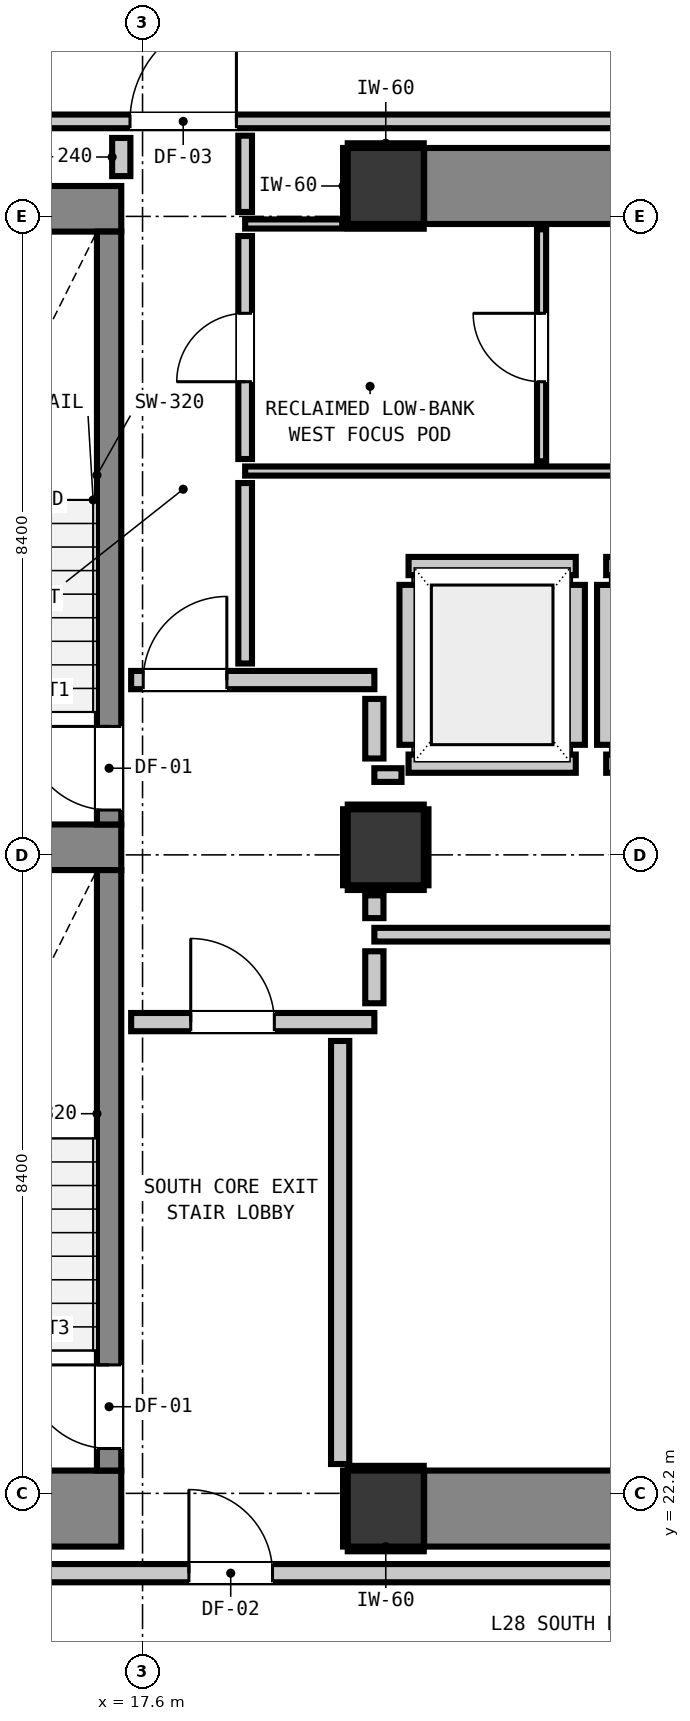
"""IFC4 building model, lengths in metres.
Left out: names, types, materials, properties, quantities, classifications, styles, units other than length and angle.
Written with IfcOpenShell. Run it as: python <this file> out.ifc"""

import sys

from ifc_helpers import new_model, si_unit, direction, frame, frame_2d, origin, origin_2d, place, context, subcontext, project, spatial, rectangle, extrude, element, fill, save


model = new_model("IFC4")
c1 = context("Model", 3, precision=1e-05, world=origin(), true_north=direction((0.0, 1.0)))
c2 = subcontext(c1, "Body", "Model", "MODEL_VIEW")
j1 = project(units=[si_unit("LENGTHUNIT", "METRE"), si_unit("PLANEANGLEUNIT", "RADIAN")], contexts=[c1])
p1 = place(None, origin())
s1 = spatial("IfcSite", under=j1, at=p1, CompositionType="ELEMENT")
p2 = place(p1, origin())
s2 = spatial("IfcBuilding", under=s1, at=p2, CompositionType="ELEMENT")
p3 = place(p2, frame((0.0, 0.0, 99.44)))
s3 = spatial("IfcBuildingStorey", under=s2, at=p3, CompositionType="ELEMENT", Elevation=99.44)
for number, where, z_axis, x_axis in (
    (1, (20.8, 22.0, 0.0), (0.0, 0.0, 1.0), (1.0, 0.0, 0.0)),
    (2, (20.8, 39.4, 0.0), (0.0, 0.0, 1.0), (1.0, 0.0, 0.0)),
):
    element("IfcColumn", number, at=place(p3, frame(where, z_axis=z_axis, x_axis=x_axis)), inside=s3, PredefinedType="COLUMN", context=c2, shape_type="SweptSolid", body=[
        extrude(rectangle(XDim=1.0, YDim=1.0, at=origin_2d()), origin(), (0.0, 0.0, 1.0), 3.32),
    ])
p4 = place(p3, frame((13.24, 22.0, 0.0), z_axis=(0.0, 0.0, 1.0), x_axis=(1.0, 0.0, 0.0)))
e3 = element("IfcWall", 3, at=p4, inside=s3, PredefinedType="SHEAR", context=c2, shape_type="SweptSolid", body=[
    extrude(rectangle(XDim=4.08, YDim=1.0, at=frame_2d((2.04, 0.0))), origin(), (0.0, 0.0, 1.0), 3.32),
])
p5 = place(p3, frame((13.24, 39.1, 0.0), z_axis=(0.0, 0.0, 1.0), x_axis=(1.0, 0.0, 0.0)))
e4 = element("IfcWall", 4, at=p5, inside=s3, PredefinedType="SHEAR", context=c2, shape_type="SweptSolid", body=[
    extrude(rectangle(XDim=4.08, YDim=0.6, at=frame_2d((2.04, 0.0))), origin(), (0.0, 0.0, 1.0), 3.32),
])
p6 = place(p3, frame((13.905, 30.7, 0.0), z_axis=(0.0, 0.0, 1.0), x_axis=(1.0, 0.0, 0.0)))
e5 = element("IfcWall", 5, at=p6, inside=s3, PredefinedType="SHEAR", context=c2, shape_type="SweptSolid", body=[
    extrude(rectangle(XDim=3.415, YDim=0.6, at=frame_2d((1.708, 0.0))), origin(), (0.0, 0.0, 1.0), 3.32),
])
for number, where, z_axis, x_axis in (
    (6, (21.305, 22.0, 0.0), (0.0, 0.0, 1.0), (1.0, 0.0, 0.0)),
    (7, (21.305, 39.4, 0.0), (0.0, 0.0, 1.0), (1.0, 0.0, 0.0)),
):
    element("IfcWall", number, at=place(p3, frame(where, z_axis=z_axis, x_axis=x_axis)), inside=s3, PredefinedType="SHEAR", context=c2, shape_type="SweptSolid", body=[
        extrude(rectangle(XDim=7.39, YDim=1.0, at=frame_2d((3.695, 0.0))), origin(), (0.0, 0.0, 1.0), 3.32),
    ])
p7 = place(p3, frame((17.16, 31.0, 0.0), z_axis=(0.0, 0.0, 1.0), x_axis=(0.0, 1.0, 0.0)))
e8 = element("IfcWall", 8, at=p7, inside=s3, PredefinedType="SHEAR", context=c2, shape_type="SweptSolid", body=[
    extrude(rectangle(XDim=7.8, YDim=0.32, at=frame_2d((3.9, 0.0))), origin(), (0.0, 0.0, 1.0), 3.32),
])
p8 = place(p7, frame((0.19, 0.0, 0.0)))
e9 = element("IfcOpeningElement", 9, at=p8, cuts=e8, PredefinedType="OPENING", context=c2, shape_type="SweptSolid", body=[
    extrude(rectangle(XDim=1.1, YDim=2.15, at=frame_2d((0.55, 1.075))), frame((0.0, 0.17, 0.0), z_axis=(0.0, -1.0, 0.0), x_axis=(1.0, 0.0, 0.0)), (0.0, 0.0, 1.0), 0.34),
])
p9 = place(p3, frame((17.16, 22.5, 0.0), z_axis=(0.0, 0.0, 1.0), x_axis=(0.0, 1.0, 0.0)))
e10 = element("IfcWall", 10, at=p9, inside=s3, PredefinedType="SHEAR", context=c2, shape_type="SweptSolid", body=[
    extrude(rectangle(XDim=7.9, YDim=0.32, at=frame_2d((3.95, 0.0))), origin(), (0.0, 0.0, 1.0), 3.32),
])
p10 = place(p9, frame((0.29, 0.0, 0.0)))
e11 = element("IfcOpeningElement", 11, at=p10, cuts=e10, PredefinedType="OPENING", context=c2, shape_type="SweptSolid", body=[
    extrude(rectangle(XDim=1.1, YDim=2.15, at=frame_2d((0.55, 1.075))), frame((0.0, 0.17, 0.0), z_axis=(0.0, -1.0, 0.0), x_axis=(1.0, 0.0, 0.0)), (0.0, 0.0, 1.0), 0.34),
])
p11 = place(p3, frame((20.8, 30.7, 0.0), z_axis=(0.0, 0.0, 1.0), x_axis=(1.0, 0.0, 0.0)))
e12 = element("IfcColumn", 12, at=p11, inside=s3, PredefinedType="COLUMN", context=c2, shape_type="SweptSolid", body=[
    extrude(rectangle(XDim=1.0, YDim=1.0, at=origin_2d()), origin(), (0.0, 0.0, 1.0), 3.32),
])
for number, where, z_axis, x_axis in (
    (13, (21.1, 31.8, 0.0), (0.0, 0.0, 1.0), (1.0, 0.0, 0.0)),
    (14, (21.1, 34.4, 0.0), (0.0, 0.0, 1.0), (1.0, 0.0, 0.0)),
):
    element("IfcWall", number, at=place(p3, frame(where, z_axis=z_axis, x_axis=x_axis)), inside=s3, PredefinedType="PARTITIONING", context=c2, shape_type="SweptSolid", body=[
        extrude(rectangle(XDim=2.2, YDim=0.24, at=frame_2d((1.1, 0.0))), origin(), (0.0, 0.0, 1.0), 3.06),
    ])
p12 = place(p3, frame((21.1, 32.048, 0.0), z_axis=(0.0, 0.0, 1.0), x_axis=(0.0, 1.0, 0.0)))
e15 = element("IfcWall", 15, at=p12, inside=s3, PredefinedType="PARTITIONING", context=c2, shape_type="SweptSolid", body=[
    extrude(rectangle(XDim=2.104, YDim=0.24, at=frame_2d((1.052, 0.0))), origin(), (0.0, 0.0, 1.0), 2.295),
])
p13 = place(p3, frame((23.3, 32.048, 0.0), z_axis=(0.0, 0.0, 1.0), x_axis=(0.0, 1.0, 0.0)))
e16 = element("IfcWall", 16, at=p13, inside=s3, PredefinedType="PARTITIONING", context=c2, shape_type="SweptSolid", body=[
    extrude(rectangle(XDim=2.104, YDim=0.24, at=frame_2d((1.052, 0.0))), origin(), (0.0, 0.0, 1.0), 3.06),
])
for number, where, z_axis, x_axis in (
    (17, (23.7, 31.8, 0.0), (0.0, 0.0, 1.0), (1.0, 0.0, 0.0)),
    (18, (23.7, 34.4, 0.0), (0.0, 0.0, 1.0), (1.0, 0.0, 0.0)),
):
    element("IfcWall", number, at=place(p3, frame(where, z_axis=z_axis, x_axis=x_axis)), inside=s3, PredefinedType="PARTITIONING", context=c2, shape_type="SweptSolid", body=[
        extrude(rectangle(XDim=2.2, YDim=0.24, at=frame_2d((1.1, 0.0))), origin(), (0.0, 0.0, 1.0), 3.06),
    ])
p14 = place(p3, frame((23.7, 32.048, 0.0), z_axis=(0.0, 0.0, 1.0), x_axis=(0.0, 1.0, 0.0)))
e19 = element("IfcWall", 19, at=p14, inside=s3, PredefinedType="PARTITIONING", context=c2, shape_type="SweptSolid", body=[
    extrude(rectangle(XDim=2.104, YDim=0.24, at=frame_2d((1.052, 0.0))), origin(), (0.0, 0.0, 1.0), 3.06),
])
p15 = place(p3, frame((12.993, 21.15, 0.0), z_axis=(0.0, 0.0, 1.0), x_axis=(1.0, 0.0, 0.0)))
e20 = element("IfcWall", 20, at=p15, inside=s3, PredefinedType="PARTITIONING", context=c2, shape_type="SweptSolid", body=[
    extrude(rectangle(XDim=30.98, YDim=0.24, at=frame_2d((15.49, 0.0))), origin(), (0.0, 0.0, 1.0), 3.06),
])
p16 = place(p15, frame((5.217, 0.0, 0.0)))
e21 = element("IfcOpeningElement", 21, at=p16, cuts=e20, PredefinedType="OPENING", context=c2, shape_type="SweptSolid", body=[
    extrude(rectangle(XDim=1.1, YDim=2.15, at=frame_2d((0.55, 1.075))), frame((0.0, 0.13, 0.0), z_axis=(0.0, -1.0, 0.0), x_axis=(1.0, 0.0, 0.0)), (0.0, 0.0, 1.0), 0.26),
])
p17 = place(p15, frame((25.057, 0.0, 0.0)))
e22 = element("IfcOpeningElement", 22, at=p17, cuts=e20, PredefinedType="OPENING", context=c2, shape_type="SweptSolid", body=[
    extrude(rectangle(XDim=1.4, YDim=2.15, at=frame_2d((0.7, 1.075))), frame((0.0, 0.13, 0.0), z_axis=(0.0, -1.0, 0.0), x_axis=(1.0, 0.0, 0.0)), (0.0, 0.0, 1.0), 0.26),
])
p18 = place(p3, frame((17.45, 28.4, 0.0), z_axis=(0.0, 0.0, 1.0), x_axis=(1.0, 0.0, 0.0)))
e23 = element("IfcWall", 23, at=p18, inside=s3, PredefinedType="PARTITIONING", context=c2, shape_type="SweptSolid", body=[
    extrude(rectangle(XDim=3.2, YDim=0.24, at=frame_2d((1.6, 0.0))), origin(), (0.0, 0.0, 1.0), 3.06),
])
p19 = place(p18, frame((0.784, 0.0, 0.0)))
e24 = element("IfcOpeningElement", 24, at=p19, cuts=e23, PredefinedType="OPENING", context=c2, shape_type="SweptSolid", body=[
    extrude(rectangle(XDim=1.1, YDim=2.15, at=frame_2d((0.55, 1.075))), frame((0.0, 0.13, 0.0), z_axis=(0.0, -1.0, 0.0), x_axis=(1.0, 0.0, 0.0)), (0.0, 0.0, 1.0), 0.26),
])
p20 = place(p3, frame((17.45, 32.9, 0.0), z_axis=(0.0, 0.0, 1.0), x_axis=(1.0, 0.0, 0.0)))
e25 = element("IfcWall", 25, at=p20, inside=s3, PredefinedType="PARTITIONING", context=c2, shape_type="SweptSolid", body=[
    extrude(rectangle(XDim=3.2, YDim=0.24, at=frame_2d((1.6, 0.0))), origin(), (0.0, 0.0, 1.0), 3.06),
])
p21 = place(p20, frame((0.159, 0.0, 0.0)))
e26 = element("IfcOpeningElement", 26, at=p21, cuts=e25, PredefinedType="OPENING", context=c2, shape_type="SweptSolid", body=[
    extrude(rectangle(XDim=1.1, YDim=2.15, at=frame_2d((0.55, 1.075))), frame((0.0, 0.13, 0.0), z_axis=(0.0, -1.0, 0.0), x_axis=(1.0, 0.0, 0.0)), (0.0, 0.0, 1.0), 0.26),
])
p22 = place(p3, frame((20.65, 29.55, 0.0), z_axis=(0.0, 0.0, 1.0), x_axis=(1.0, 0.0, 0.0)))
e27 = element("IfcWall", 27, at=p22, inside=s3, PredefinedType="PARTITIONING", context=c2, shape_type="SweptSolid", body=[
    extrude(rectangle(XDim=9.325, YDim=0.18, at=frame_2d((4.663, 0.0))), origin(), (0.0, 0.0, 1.0), 3.06),
])
p23 = place(p3, frame((20.65, 31.65, 0.0), z_axis=(0.0, 0.0, 1.0), x_axis=(1.0, 0.0, 0.0)))
e28 = element("IfcWall", 28, at=p23, inside=s3, PredefinedType="PARTITIONING", context=c2, shape_type="SweptSolid", body=[
    extrude(rectangle(XDim=0.357, YDim=0.18, at=frame_2d((0.179, 0.0))), origin(), (0.0, 0.0, 1.0), 3.06),
])
p24 = place(p3, frame((1.827, 40.25, 0.0), z_axis=(0.0, 0.0, 1.0), x_axis=(1.0, 0.0, 0.0)))
e29 = element("IfcWall", 29, at=p24, inside=s3, PredefinedType="PARTITIONING", context=c2, shape_type="SweptSolid", body=[
    extrude(rectangle(XDim=42.146, YDim=0.18, at=frame_2d((21.073, 0.0))), origin(), (0.0, 0.0, 1.0), 3.06),
])
p25 = place(p24, frame((15.608, 0.0, 0.0)))
e30 = element("IfcOpeningElement", 30, at=p25, cuts=e29, PredefinedType="OPENING", context=c2, shape_type="SweptSolid", body=[
    extrude(rectangle(XDim=1.4, YDim=2.15, at=frame_2d((0.7, 1.075))), frame((0.0, 0.1, 0.0), z_axis=(0.0, -1.0, 0.0), x_axis=(1.0, 0.0, 0.0)), (0.0, 0.0, 1.0), 0.2),
])
p26 = place(p24, frame((8.623, 0.0, 0.0)))
e31 = element("IfcOpeningElement", 31, at=p26, cuts=e29, PredefinedType="OPENING", context=c2, shape_type="SweptSolid", body=[
    extrude(rectangle(XDim=1.4, YDim=2.15, at=frame_2d((0.7, 1.075))), frame((0.0, 0.1, 0.0), z_axis=(0.0, -1.0, 0.0), x_axis=(1.0, 0.0, 0.0)), (0.0, 0.0, 1.0), 0.2),
])
p27 = place(p24, frame((36.223, 0.0, 0.0)))
e32 = element("IfcOpeningElement", 32, at=p27, cuts=e29, PredefinedType="OPENING", context=c2, shape_type="SweptSolid", body=[
    extrude(rectangle(XDim=1.4, YDim=2.15, at=frame_2d((0.7, 1.075))), frame((0.0, 0.1, 0.0), z_axis=(0.0, -1.0, 0.0), x_axis=(1.0, 0.0, 0.0)), (0.0, 0.0, 1.0), 0.2),
])
p28 = place(p24, frame((3.697, 0.0, 0.0)))
e33 = element("IfcOpeningElement", 33, at=p28, cuts=e29, PredefinedType="OPENING", context=c2, shape_type="SweptSolid", body=[
    extrude(rectangle(XDim=0.95, YDim=2.1, at=frame_2d((0.475, 1.05))), frame((0.0, 0.1, 0.0), z_axis=(0.0, -1.0, 0.0), x_axis=(1.0, 0.0, 0.0)), (0.0, 0.0, 1.0), 0.2),
])
p29 = place(p24, frame((39.574, 0.0, 0.0)))
e34 = element("IfcOpeningElement", 34, at=p29, cuts=e29, PredefinedType="OPENING", context=c2, shape_type="SweptSolid", body=[
    extrude(rectangle(XDim=0.9, YDim=2.1, at=frame_2d((0.45, 1.05))), frame((0.0, 0.1, 0.0), z_axis=(0.0, -1.0, 0.0), x_axis=(1.0, 0.0, 0.0)), (0.0, 0.0, 1.0), 0.2),
])
p30 = place(p3, frame((18.95, 35.65, 0.0), z_axis=(0.0, 0.0, 1.0), x_axis=(1.0, 0.0, 0.0)))
e35 = element("IfcWall", 35, at=p30, inside=s3, PredefinedType="PARTITIONING", context=c2, shape_type="SweptSolid", body=[
    extrude(rectangle(XDim=11.025, YDim=0.12, at=frame_2d((5.513, 0.0))), origin(), (0.0, 0.0, 1.0), 3.06),
])
p31 = place(p3, frame((18.95, 38.9, 0.0), z_axis=(0.0, 0.0, 1.0), x_axis=(1.0, 0.0, 0.0)))
e36 = element("IfcWall", 36, at=p31, inside=s3, PredefinedType="PARTITIONING", context=c2, shape_type="SweptSolid", body=[
    extrude(rectangle(XDim=1.278, YDim=0.12, at=frame_2d((0.639, 0.0))), origin(), (0.0, 0.0, 1.0), 3.06),
])
p32 = place(p3, frame((17.32, 39.53, 0.0), z_axis=(0.0, 0.0, 1.0), x_axis=(0.0, 1.0, 0.0)))
e37 = element("IfcWall", 37, at=p32, inside=s3, PredefinedType="PARTITIONING", context=c2, shape_type="SweptSolid", body=[
    extrude(rectangle(XDim=0.502, YDim=0.24, at=frame_2d((0.251, 0.0))), origin(), (0.0, 0.0, 1.0), 3.06),
])
p33 = place(p3, frame((20.2, 22.586, 0.0), z_axis=(0.0, 0.0, 1.0), x_axis=(0.0, 1.0, 0.0)))
e38 = element("IfcWall", 38, at=p33, inside=s3, PredefinedType="PARTITIONING", context=c2, shape_type="SweptSolid", body=[
    extrude(rectangle(XDim=5.566, YDim=0.24, at=frame_2d((2.783, 0.0))), origin(), (0.0, 0.0, 1.0), 3.06),
])
p34 = place(p3, frame((20.65, 28.648, 0.0), z_axis=(0.0, 0.0, 1.0), x_axis=(0.0, 1.0, 0.0)))
e39 = element("IfcWall", 39, at=p34, inside=s3, PredefinedType="PARTITIONING", context=c2, shape_type="SweptSolid", body=[
    extrude(rectangle(XDim=0.684, YDim=0.24, at=frame_2d((0.342, 0.0))), origin(), (0.0, 0.0, 1.0), 2.295),
])
p35 = place(p3, frame((20.65, 29.768, 0.0), z_axis=(0.0, 0.0, 1.0), x_axis=(0.0, 1.0, 0.0)))
e40 = element("IfcWall", 40, at=p35, inside=s3, PredefinedType="PARTITIONING", context=c2, shape_type="SweptSolid", body=[
    extrude(rectangle(XDim=0.3, YDim=0.24, at=frame_2d((0.15, 0.0))), origin(), (0.0, 0.0, 1.0), 2.295),
])
p36 = place(p3, frame((20.65, 31.868, 0.0), z_axis=(0.0, 0.0, 1.0), x_axis=(0.0, 1.0, 0.0)))
e41 = element("IfcWall", 41, at=p36, inside=s3, PredefinedType="PARTITIONING", context=c2, shape_type="SweptSolid", body=[
    extrude(rectangle(XDim=0.784, YDim=0.24, at=frame_2d((0.392, 0.0))), origin(), (0.0, 0.0, 1.0), 2.295),
])
p37 = place(p3, frame((18.95, 33.118, 0.0), z_axis=(0.0, 0.0, 1.0), x_axis=(0.0, 1.0, 0.0)))
e42 = element("IfcWall", 42, at=p37, inside=s3, PredefinedType="PARTITIONING", context=c2, shape_type="SweptSolid", body=[
    extrude(rectangle(XDim=2.374, YDim=0.18, at=frame_2d((1.187, 0.0))), origin(), (0.0, 0.0, 1.0), 3.06),
])
p38 = place(p3, frame((18.95, 35.808, 0.0), z_axis=(0.0, 0.0, 1.0), x_axis=(0.0, 1.0, 0.0)))
e43 = element("IfcWall", 43, at=p38, inside=s3, PredefinedType="PARTITIONING", context=c2, shape_type="SweptSolid", body=[
    extrude(rectangle(XDim=2.934, YDim=0.18, at=frame_2d((1.467, 0.0))), origin(), (0.0, 0.0, 1.0), 3.06),
])
p39 = place(p38, frame((1.017, 0.0, 0.0)))
e44 = element("IfcOpeningElement", 44, at=p39, cuts=e43, PredefinedType="OPENING", context=c2, shape_type="SweptSolid", body=[
    extrude(rectangle(XDim=0.9, YDim=2.1, at=frame_2d((0.45, 1.05))), frame((0.0, 0.1, 0.0), z_axis=(0.0, -1.0, 0.0), x_axis=(1.0, 0.0, 0.0)), (0.0, 0.0, 1.0), 0.2),
])
p40 = place(p3, frame((18.95, 39.058, 0.0), z_axis=(0.0, 0.0, 1.0), x_axis=(0.0, 1.0, 0.0)))
e45 = element("IfcWall", 45, at=p40, inside=s3, PredefinedType="PARTITIONING", context=c2, shape_type="SweptSolid", body=[
    extrude(rectangle(XDim=1.004, YDim=0.18, at=frame_2d((0.502, 0.0))), origin(), (0.0, 0.0, 1.0), 3.06),
])
p41 = place(p3, frame((22.85, 35.778, 0.0), z_axis=(0.0, 0.0, 1.0), x_axis=(0.0, 1.0, 0.0)))
e46 = element("IfcWall", 46, at=p41, inside=s3, PredefinedType="PARTITIONING", context=c2, shape_type="SweptSolid", body=[
    extrude(rectangle(XDim=3.052, YDim=0.12, at=frame_2d((1.526, 0.0))), origin(), (0.0, 0.0, 1.0), 3.06),
])
p42 = place(p41, frame((1.047, 0.0, 0.0)))
e47 = element("IfcOpeningElement", 47, at=p42, cuts=e46, PredefinedType="OPENING", context=c2, shape_type="SweptSolid", body=[
    extrude(rectangle(XDim=0.9, YDim=2.1, at=frame_2d((0.45, 1.05))), frame((0.0, 0.07, 0.0), z_axis=(0.0, -1.0, 0.0), x_axis=(1.0, 0.0, 0.0)), (0.0, 0.0, 1.0), 0.14),
])
for number, where, z_axis, x_axis in (
    (48, (20.3, 21.468, 0.0), (0.0, 0.0, 1.0), (1.0, 0.0, 0.0)),
    (49, (20.3, 22.532, 0.0), (0.0, 0.0, 1.0), (1.0, 0.0, 0.0)),
    (50, (20.268, 21.5, 0.0), (0.0, 0.0, 1.0), (0.0, 1.0, 0.0)),
    (51, (20.3, 38.868, 0.0), (0.0, 0.0, 1.0), (1.0, 0.0, 0.0)),
    (52, (20.3, 39.932, 0.0), (0.0, 0.0, 1.0), (1.0, 0.0, 0.0)),
    (53, (20.268, 38.9, 0.0), (0.0, 0.0, 1.0), (0.0, 1.0, 0.0)),
    (54, (20.3, 30.168, 0.0), (0.0, 0.0, 1.0), (1.0, 0.0, 0.0)),
    (55, (20.3, 31.232, 0.0), (0.0, 0.0, 1.0), (1.0, 0.0, 0.0)),
    (56, (20.268, 30.2, 0.0), (0.0, 0.0, 1.0), (0.0, 1.0, 0.0)),
    (57, (21.332, 30.2, 0.0), (0.0, 0.0, 1.0), (0.0, 1.0, 0.0)),
):
    element("IfcWall", number, at=place(p3, frame(where, z_axis=z_axis, x_axis=x_axis)), inside=s3, PredefinedType="PARTITIONING", context=c2, shape_type="SweptSolid", body=[
        extrude(rectangle(XDim=1.0, YDim=0.06, at=frame_2d((0.5, 0.0))), origin(), (0.0, 0.0, 1.0), 1.45),
    ])
p43 = place(p8, origin())
e58 = element("IfcDoor", 58, at=p43, inside=s3, OperationType="SINGLE_SWING_RIGHT", PredefinedType="DOOR", context=c2, shape_type="SweptSolid", body=[
    extrude(rectangle(XDim=1.1, YDim=2.15, at=frame_2d((0.55, 1.075))), frame((0.0, 0.025, 0.0), z_axis=(0.0, -1.0, 0.0), x_axis=(1.0, 0.0, 0.0)), (0.0, 0.0, 1.0), 0.05),
])
fill(e9, e58)
p44 = place(p10, origin())
e59 = element("IfcDoor", 59, at=p44, inside=s3, OperationType="SINGLE_SWING_RIGHT", PredefinedType="DOOR", context=c2, shape_type="SweptSolid", body=[
    extrude(rectangle(XDim=1.1, YDim=2.15, at=frame_2d((0.55, 1.075))), frame((0.0, 0.025, 0.0), z_axis=(0.0, -1.0, 0.0), x_axis=(1.0, 0.0, 0.0)), (0.0, 0.0, 1.0), 0.05),
])
fill(e11, e59)
p45 = place(p19, origin())
e60 = element("IfcDoor", 60, at=p45, inside=s3, OperationType="SINGLE_SWING_LEFT", PredefinedType="DOOR", context=c2, shape_type="SweptSolid", body=[
    extrude(rectangle(XDim=1.1, YDim=2.15, at=frame_2d((0.55, 1.075))), frame((0.0, 0.025, 0.0), z_axis=(0.0, -1.0, 0.0), x_axis=(1.0, 0.0, 0.0)), (0.0, 0.0, 1.0), 0.05),
])
fill(e24, e60)
p46 = place(p21, origin())
e61 = element("IfcDoor", 61, at=p46, inside=s3, OperationType="SINGLE_SWING_RIGHT", PredefinedType="DOOR", context=c2, shape_type="SweptSolid", body=[
    extrude(rectangle(XDim=1.1, YDim=2.15, at=frame_2d((0.55, 1.075))), frame((0.0, 0.025, 0.0), z_axis=(0.0, -1.0, 0.0), x_axis=(1.0, 0.0, 0.0)), (0.0, 0.0, 1.0), 0.05),
])
fill(e26, e61)
p47 = place(p16, origin())
e62 = element("IfcDoor", 62, at=p47, inside=s3, OperationType="SINGLE_SWING_LEFT", PredefinedType="DOOR", context=c2, shape_type="SweptSolid", body=[
    extrude(rectangle(XDim=1.1, YDim=2.15, at=frame_2d((0.55, 1.075))), frame((0.0, 0.025, 0.0), z_axis=(0.0, -1.0, 0.0), x_axis=(1.0, 0.0, 0.0)), (0.0, 0.0, 1.0), 0.05),
])
fill(e21, e62)
p48 = place(p25, origin())
e63 = element("IfcDoor", 63, at=p48, inside=s3, OperationType="SINGLE_SWING_RIGHT", PredefinedType="DOOR", context=c2, shape_type="SweptSolid", body=[
    extrude(rectangle(XDim=1.4, YDim=2.15, at=frame_2d((0.7, 1.075))), frame((0.0, 0.025, 0.0), z_axis=(0.0, -1.0, 0.0), x_axis=(1.0, 0.0, 0.0)), (0.0, 0.0, 1.0), 0.05),
])
fill(e30, e63)
p49 = place(p39, origin())
e64 = element("IfcDoor", 64, at=p49, inside=s3, OperationType="SINGLE_SWING_LEFT", PredefinedType="DOOR", context=c2, shape_type="SweptSolid", body=[
    extrude(rectangle(XDim=0.9, YDim=2.1, at=frame_2d((0.45, 1.05))), frame((0.0, 0.025, 0.0), z_axis=(0.0, -1.0, 0.0), x_axis=(1.0, 0.0, 0.0)), (0.0, 0.0, 1.0), 0.05),
])
fill(e44, e64)
p50 = place(p42, origin())
e65 = element("IfcDoor", 65, at=p50, inside=s3, OperationType="SINGLE_SWING_RIGHT", PredefinedType="DOOR", context=c2, shape_type="SweptSolid", body=[
    extrude(rectangle(XDim=0.9, YDim=2.1, at=frame_2d((0.45, 1.05))), frame((0.0, 0.025, 0.0), z_axis=(0.0, -1.0, 0.0), x_axis=(1.0, 0.0, 0.0)), (0.0, 0.0, 1.0), 0.05),
])
fill(e47, e65)
save(model, sys.argv[1])
